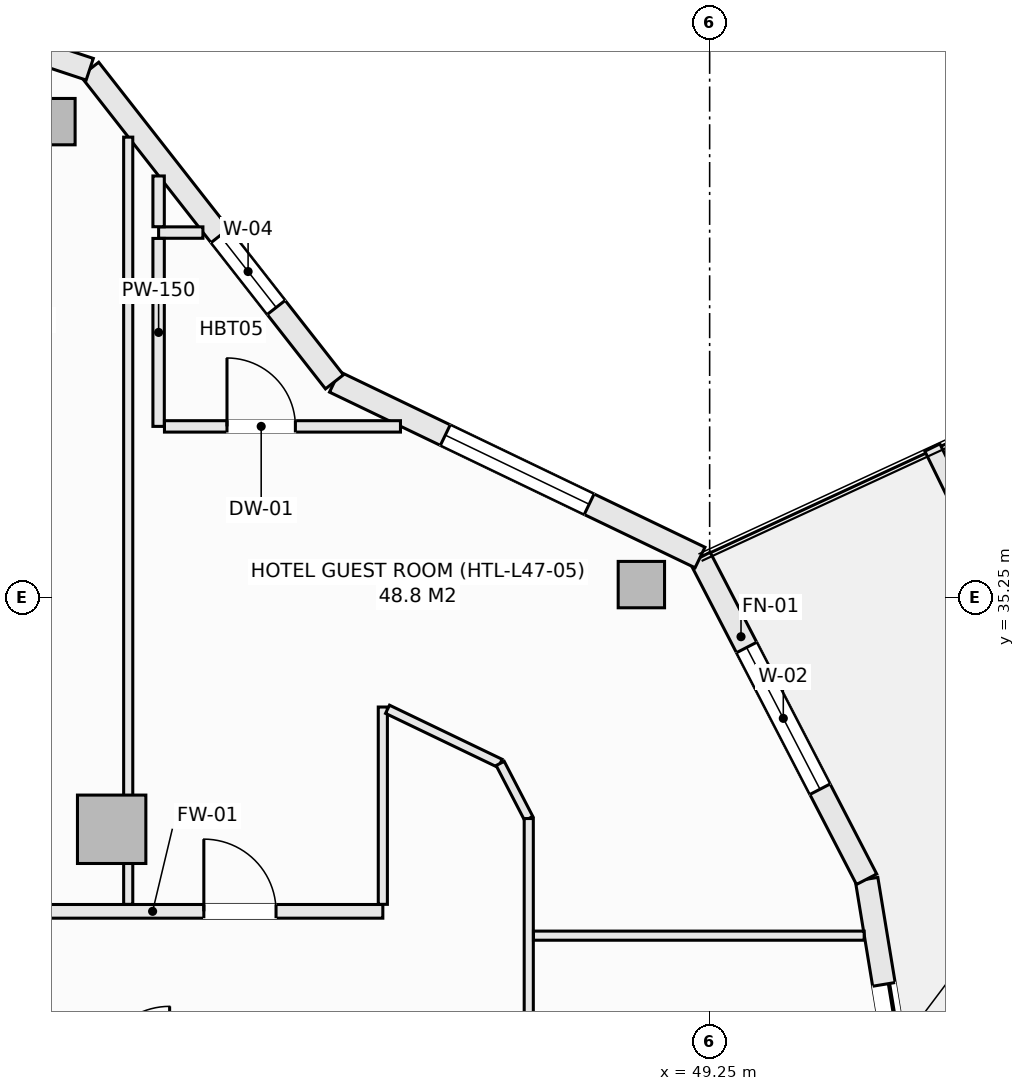
"""IFC4 building model, lengths in metres.
Left out: names, types, materials, properties, quantities, classifications, styles, units other than length and angle.
Written with IfcOpenShell. Run it as: python <this file> out.ifc"""

import sys

from ifc_helpers import new_model, si_unit, direction, frame, frame_2d, origin, origin_2d, place, context, subcontext, project, spatial, rectangle, hollow_rectangle, extrude, element, fill, save


model = new_model("IFC4")
c1 = context("Model", 3, precision=1e-05, world=origin(), true_north=direction((0.0, 1.0)))
c2 = subcontext(c1, "Body", "Model", "MODEL_VIEW")
j1 = project(units=[si_unit("LENGTHUNIT", "METRE"), si_unit("PLANEANGLEUNIT", "RADIAN")], contexts=[c1])
p1 = place(None, origin())
s1 = spatial("IfcSite", under=j1, at=p1, CompositionType="ELEMENT")
p2 = place(p1, origin())
s2 = spatial("IfcBuilding", under=s1, at=p2, CompositionType="ELEMENT")
p3 = place(p2, frame((0.0, 0.0, 180.1)))
s3 = spatial("IfcBuildingStorey", under=s2, at=p3, CompositionType="ELEMENT", Elevation=180.1)
for number, where, z_axis, x_axis in (
    (1, (48.352, 35.419, -0.27), (0.0, 0.0, 1.0), (1.0, 0.0, 0.0)),
    (2, (40.596, 41.51, -0.27), (0.0, 0.0, 1.0), (1.0, 0.0, 0.0)),
):
    element("IfcColumn", number, at=place(p3, frame(where, z_axis=z_axis, x_axis=x_axis)), inside=s3, PredefinedType="COLUMN", context=c2, shape_type="SweptSolid", body=[
        extrude(hollow_rectangle(XDim=0.61, YDim=0.61, WallThickness=0.025, at=origin_2d()), origin(), (0.0, 0.0, 1.0), 3.4),
    ])
p4 = place(p3, frame((41.382, 32.199, -0.27), z_axis=(0.0, 0.0, 1.0), x_axis=(1.0, 0.0, 0.0)))
e3 = element("IfcColumn", 3, at=p4, inside=s3, PredefinedType="COLUMN", context=c2, shape_type="SweptSolid", body=[
    extrude(rectangle(XDim=0.9, YDim=0.9, at=origin_2d()), origin(), (0.0, 0.0, 1.0), 3.4),
])
p5 = place(p3, frame((51.315, 31.542, 0.0), z_axis=(0.0, 0.0, 1.0), x_axis=(0.162394765401, -0.986725868806, 0.0)))
e4 = element("IfcWall", 4, at=p5, inside=s3, PredefinedType="SOLIDWALL", context=c2, shape_type="SweptSolid", body=[
    extrude(rectangle(XDim=4.603, YDim=0.3, at=frame_2d((2.302, 0.0))), origin(), (0.0, 0.0, 1.0), 2.653),
])
p6 = place(p5, frame((1.402, 0.0, 0.0)))
e5 = element("IfcOpeningElement", 5, at=p6, cuts=e4, PredefinedType="OPENING", context=c2, shape_type="SweptSolid", body=[
    extrude(rectangle(XDim=1.8, YDim=2.25, at=frame_2d((0.9, 1.125))), frame((0.0, 0.16, 0.0), z_axis=(0.0, -1.0, 0.0), x_axis=(1.0, 0.0, 0.0)), (0.0, 0.0, 1.0), 0.32),
])
p7 = place(p3, frame((49.123, 35.775, 0.0), z_axis=(0.0, 0.0, 1.0), x_axis=(0.459810251451, -0.888017191647, 0.0)))
e6 = element("IfcWall", 6, at=p7, inside=s3, PredefinedType="SOLIDWALL", context=c2, shape_type="SweptSolid", body=[
    extrude(rectangle(XDim=4.766, YDim=0.3, at=frame_2d((2.383, 0.0))), origin(), (0.0, 0.0, 1.0), 2.653),
])
p8 = place(p7, frame((1.333, 0.0, 0.74)))
e7 = element("IfcOpeningElement", 7, at=p8, cuts=e6, PredefinedType="OPENING", context=c2, shape_type="SweptSolid", body=[
    extrude(rectangle(XDim=2.1, YDim=1.7, at=frame_2d((1.05, 0.85))), frame((0.0, 0.16, 0.0), z_axis=(0.0, -1.0, 0.0), x_axis=(1.0, 0.0, 0.0)), (0.0, 0.0, 1.0), 0.32),
])
p9 = place(p3, frame((44.313, 38.086, 0.0), z_axis=(0.0, 0.0, 1.0), x_axis=(0.901353070301, -0.433085029363, 0.0)))
e8 = element("IfcWall", 8, at=p9, inside=s3, PredefinedType="SOLIDWALL", context=c2, shape_type="SweptSolid", body=[
    extrude(rectangle(XDim=5.336, YDim=0.3, at=frame_2d((2.668, 0.0))), origin(), (0.0, 0.0, 1.0), 2.653),
])
p10 = place(p9, frame((1.618, 0.0, 0.74)))
e9 = element("IfcOpeningElement", 9, at=p10, cuts=e8, PredefinedType="OPENING", context=c2, shape_type="SweptSolid", body=[
    extrude(rectangle(XDim=2.1, YDim=1.7, at=frame_2d((1.05, 0.85))), frame((0.0, 0.16, 0.0), z_axis=(0.0, -1.0, 0.0), x_axis=(1.0, 0.0, 0.0)), (0.0, 0.0, 1.0), 0.32),
])
p11 = place(p3, frame((41.094, 42.199, 0.0), z_axis=(0.0, 0.0, 1.0), x_axis=(0.616429245738, -0.787410302828, 0.0)))
e10 = element("IfcWall", 10, at=p11, inside=s3, PredefinedType="SOLIDWALL", context=c2, shape_type="SweptSolid", body=[
    extrude(rectangle(XDim=5.223, YDim=0.3, at=frame_2d((2.612, 0.0))), origin(), (0.0, 0.0, 1.0), 2.653),
])
p12 = place(p11, frame((2.78, 0.0, 0.72)))
e11 = element("IfcOpeningElement", 11, at=p12, cuts=e10, PredefinedType="OPENING", context=c2, shape_type="SweptSolid", body=[
    extrude(rectangle(XDim=1.2, YDim=1.65, at=frame_2d((0.6, 0.825))), frame((0.0, 0.16, 0.0), z_axis=(0.0, -1.0, 0.0), x_axis=(1.0, 0.0, 0.0)), (0.0, 0.0, 1.0), 0.32),
])
p13 = place(p3, frame((35.803, 43.952, 0.0), z_axis=(0.0, 0.0, 1.0), x_axis=(0.949246811547, -0.314532177636, 0.0)))
e12 = element("IfcWall", 12, at=p13, inside=s3, PredefinedType="SOLIDWALL", context=c2, shape_type="SweptSolid", body=[
    extrude(rectangle(XDim=5.574, YDim=0.3, at=frame_2d((2.787, 0.0))), origin(), (0.0, 0.0, 1.0), 2.653),
])
p14 = place(p13, frame((1.737, 0.0, 0.74)))
e13 = element("IfcOpeningElement", 13, at=p14, cuts=e12, PredefinedType="OPENING", context=c2, shape_type="SweptSolid", body=[
    extrude(rectangle(XDim=2.1, YDim=1.7, at=frame_2d((1.05, 0.85))), frame((0.0, 0.16, 0.0), z_axis=(0.0, -1.0, 0.0), x_axis=(1.0, 0.0, 0.0)), (0.0, 0.0, 1.0), 0.32),
])
p15 = place(p3, frame((52.18, 37.221, 0.0), z_axis=(0.0, 0.0, 1.0), x_axis=(0.439637174641, -0.898175458735, 0.0)))
e14 = element("IfcWall", 14, at=p15, inside=s3, PredefinedType="PARAPET", context=c2, shape_type="SweptSolid", body=[
    extrude(rectangle(XDim=5.567, YDim=0.22, at=frame_2d((2.784, 0.0))), origin(), (0.0, 0.0, 1.0), 0.52),
])
p16 = place(p3, frame((38.892, 31.12, 0.0), z_axis=(0.0, 0.0, 1.0), x_axis=(1.0, 0.0, 0.0)))
e15 = element("IfcWall", 15, at=p16, inside=s3, PredefinedType="SOLIDWALL", context=c2, shape_type="SweptSolid", body=[
    extrude(rectangle(XDim=6.058, YDim=0.18, at=frame_2d((3.029, 0.0))), origin(), (0.0, 0.0, 1.0), 3.13),
])
p17 = place(p16, frame((3.703, 0.0, 0.0)))
e16 = element("IfcOpeningElement", 16, at=p17, cuts=e15, PredefinedType="OPENING", context=c2, shape_type="SweptSolid", body=[
    extrude(rectangle(XDim=0.95, YDim=2.1, at=frame_2d((0.475, 1.05))), frame((0.0, 0.1, 0.0), z_axis=(0.0, -1.0, 0.0), x_axis=(1.0, 0.0, 0.0)), (0.0, 0.0, 1.0), 0.2),
])
p18 = place(p16, frame((0.664, 0.0, 0.0)))
e17 = element("IfcOpeningElement", 17, at=p18, cuts=e15, PredefinedType="OPENING", context=c2, shape_type="SweptSolid", body=[
    extrude(rectangle(XDim=0.95, YDim=2.1, at=frame_2d((0.475, 1.05))), frame((0.0, 0.1, 0.0), z_axis=(0.0, -1.0, 0.0), x_axis=(1.0, 0.0, 0.0)), (0.0, 0.0, 1.0), 0.2),
])
p19 = place(p3, frame((44.95, 31.212, 0.0), z_axis=(0.0, 0.0, 1.0), x_axis=(0.0, 1.0, 0.0)))
e18 = element("IfcWall", 18, at=p19, inside=s3, PredefinedType="PARTITIONING", context=c2, shape_type="SweptSolid", body=[
    extrude(rectangle(XDim=2.596, YDim=0.12, at=frame_2d((1.298, 0.0))), origin(), (0.0, 0.0, 1.0), 3.13),
])
p20 = place(p3, frame((45.012, 33.778, 0.0), z_axis=(0.0, 0.0, 1.0), x_axis=(0.901268034538, -0.433261964544, 0.0)))
e19 = element("IfcWall", 19, at=p20, inside=s3, PredefinedType="PARTITIONING", context=c2, shape_type="SweptSolid", body=[
    extrude(rectangle(XDim=1.644, YDim=0.12, at=frame_2d((0.822, 0.0))), origin(), (0.0, 0.0, 1.0), 3.13),
])
p21 = place(p3, frame((46.494, 33.066, 0.0), z_axis=(0.0, 0.0, 1.0), x_axis=(0.460674892026, -0.887568951607, 0.0)))
e20 = element("IfcWall", 20, at=p21, inside=s3, PredefinedType="PARTITIONING", context=c2, shape_type="SweptSolid", body=[
    extrude(rectangle(XDim=0.817, YDim=0.12, at=frame_2d((0.408, 0.0))), origin(), (0.0, 0.0, 1.0), 3.13),
])
p22 = place(p3, frame((46.87, 21.659, 0.0), z_axis=(0.0, 0.0, 1.0), x_axis=(0.0, 1.0, 0.0)))
e21 = element("IfcWall", 21, at=p22, inside=s3, PredefinedType="PARTITIONING", context=c2, shape_type="SweptSolid", body=[
    extrude(rectangle(XDim=10.682, YDim=0.12, at=frame_2d((5.341, 0.0))), origin(), (0.0, 0.0, 1.0), 3.13),
])
p23 = place(p22, frame((4.866, 0.0, 0.0)))
e22 = element("IfcOpeningElement", 22, at=p23, cuts=e21, PredefinedType="OPENING", context=c2, shape_type="SweptSolid", body=[
    extrude(rectangle(XDim=0.95, YDim=2.1, at=frame_2d((0.475, 1.05))), frame((0.0, 0.07, 0.0), z_axis=(0.0, -1.0, 0.0), x_axis=(1.0, 0.0, 0.0)), (0.0, 0.0, 1.0), 0.14),
])
p24 = place(p3, frame((46.932, 30.8, 0.0), z_axis=(0.0, 0.0, 1.0), x_axis=(1.0, 0.0, 0.0)))
e23 = element("IfcWall", 23, at=p24, inside=s3, PredefinedType="PARTITIONING", context=c2, shape_type="SweptSolid", body=[
    extrude(rectangle(XDim=4.351, YDim=0.12, at=frame_2d((2.176, 0.0))), origin(), (0.0, 0.0, 1.0), 3.13),
])
p25 = place(p3, frame((41.6, 31.212, 0.0), z_axis=(0.0, 0.0, 1.0), x_axis=(0.0, 1.0, 0.0)))
e24 = element("IfcWall", 24, at=p25, inside=s3, PredefinedType="PARTITIONING", context=c2, shape_type="SweptSolid", body=[
    extrude(rectangle(XDim=10.094, YDim=0.12, at=frame_2d((5.047, 0.0))), origin(), (0.0, 0.0, 1.0), 2.505),
])
p26 = place(p3, frame((42.0, 40.05, 0.0), z_axis=(0.0, 0.0, 1.0), x_axis=(1.0, 0.0, 0.0)))
e25 = element("IfcWall", 25, at=p26, inside=s3, PredefinedType="PARTITIONING", context=c2, shape_type="SweptSolid", body=[
    extrude(rectangle(XDim=0.583, YDim=0.15, at=frame_2d((0.292, 0.0))), origin(), (0.0, 0.0, 1.0), 2.653),
])
p27 = place(p3, frame((42.0, 37.5, 0.0), z_axis=(0.0, 0.0, 1.0), x_axis=(0.0, 1.0, 0.0)))
e26 = element("IfcWall", 26, at=p27, inside=s3, PredefinedType="PARTITIONING", context=c2, shape_type="SweptSolid", body=[
    extrude(rectangle(XDim=2.473, YDim=0.15, at=frame_2d((1.236, 0.0))), origin(), (0.0, 0.0, 1.0), 3.13),
])
p28 = place(p3, frame((42.0, 40.127, 0.0), z_axis=(0.0, 0.0, 1.0), x_axis=(0.0, 1.0, 0.0)))
e27 = element("IfcWall", 27, at=p28, inside=s3, PredefinedType="PARTITIONING", context=c2, shape_type="SweptSolid", body=[
    extrude(rectangle(XDim=0.668, YDim=0.15, at=frame_2d((0.334, 0.0))), origin(), (0.0, 0.0, 1.0), 3.13),
])
p29 = place(p3, frame((42.077, 37.5, 0.0), z_axis=(0.0, 0.0, 1.0), x_axis=(1.0, 0.0, 0.0)))
e28 = element("IfcWall", 28, at=p29, inside=s3, PredefinedType="PARTITIONING", context=c2, shape_type="SweptSolid", body=[
    extrude(rectangle(XDim=3.105, YDim=0.15, at=frame_2d((1.553, 0.0))), origin(), (0.0, 0.0, 1.0), 2.812),
])
p30 = place(p29, frame((0.823, 0.0, 0.0)))
e29 = element("IfcOpeningElement", 29, at=p30, cuts=e28, PredefinedType="OPENING", context=c2, shape_type="SweptSolid", body=[
    extrude(rectangle(XDim=0.9, YDim=2.1, at=frame_2d((0.45, 1.05))), frame((0.0, 0.085, 0.0), z_axis=(0.0, -1.0, 0.0), x_axis=(1.0, 0.0, 0.0)), (0.0, 0.0, 1.0), 0.17),
])
p31 = place(p6, origin())
e30 = element("IfcDoor", 30, at=p31, inside=s3, OperationType="SLIDING_TO_LEFT", PredefinedType="DOOR", context=c2, shape_type="SweptSolid", body=[
    extrude(rectangle(XDim=1.8, YDim=2.25, at=frame_2d((0.9, 1.125))), frame((0.0, 0.025, 0.0), z_axis=(0.0, -1.0, 0.0), x_axis=(1.0, 0.0, 0.0)), (0.0, 0.0, 1.0), 0.05),
])
fill(e5, e30)
p32 = place(p8, origin())
e31 = element("IfcWindow", 31, at=p32, inside=s3, PartitioningType="SINGLE_PANEL", PredefinedType="WINDOW", context=c2, shape_type="SweptSolid", body=[
    extrude(rectangle(XDim=2.1, YDim=1.7, at=frame_2d((1.05, 0.85))), frame((0.0, 0.03, 0.0), z_axis=(0.0, -1.0, 0.0), x_axis=(1.0, 0.0, 0.0)), (0.0, 0.0, 1.0), 0.06),
])
fill(e7, e31)
p33 = place(p10, origin())
e32 = element("IfcWindow", 32, at=p33, inside=s3, PartitioningType="SINGLE_PANEL", PredefinedType="WINDOW", context=c2, shape_type="SweptSolid", body=[
    extrude(rectangle(XDim=2.1, YDim=1.7, at=frame_2d((1.05, 0.85))), frame((0.0, 0.03, 0.0), z_axis=(0.0, -1.0, 0.0), x_axis=(1.0, 0.0, 0.0)), (0.0, 0.0, 1.0), 0.06),
])
fill(e9, e32)
p34 = place(p12, origin())
e33 = element("IfcWindow", 33, at=p34, inside=s3, PartitioningType="SINGLE_PANEL", PredefinedType="WINDOW", context=c2, shape_type="SweptSolid", body=[
    extrude(rectangle(XDim=1.2, YDim=1.65, at=frame_2d((0.6, 0.825))), frame((0.0, 0.03, 0.0), z_axis=(0.0, -1.0, 0.0), x_axis=(1.0, 0.0, 0.0)), (0.0, 0.0, 1.0), 0.06),
])
fill(e11, e33)
p35 = place(p17, origin())
e34 = element("IfcDoor", 34, at=p35, inside=s3, OperationType="SINGLE_SWING_LEFT", PredefinedType="DOOR", context=c2, shape_type="SweptSolid", body=[
    extrude(rectangle(XDim=0.95, YDim=2.1, at=frame_2d((0.475, 1.05))), frame((0.0, 0.025, 0.0), z_axis=(0.0, -1.0, 0.0), x_axis=(1.0, 0.0, 0.0)), (0.0, 0.0, 1.0), 0.05),
])
fill(e16, e34)
p36 = place(p30, origin())
e35 = element("IfcDoor", 35, at=p36, inside=s3, OperationType="SINGLE_SWING_LEFT", PredefinedType="DOOR", context=c2, shape_type="SweptSolid", body=[
    extrude(rectangle(XDim=0.9, YDim=2.1, at=frame_2d((0.45, 1.05))), frame((0.0, 0.025, 0.0), z_axis=(0.0, -1.0, 0.0), x_axis=(1.0, 0.0, 0.0)), (0.0, 0.0, 1.0), 0.05),
])
fill(e29, e35)
save(model, sys.argv[1])
